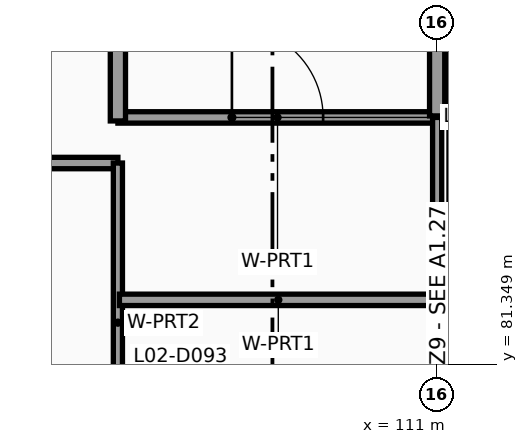
"""IFC4 building model, lengths in metres.
Left out: names, types, materials, properties, quantities, classifications, styles, units other than length and angle.
Written with IfcOpenShell. Run it as: python <this file> out.ifc"""

import sys

from ifc_helpers import new_model, si_unit, direction, frame, frame_2d, origin, place, context, subcontext, project, spatial, rectangle, extrude, element, fill, save


model = new_model("IFC4")
c1 = context("Model", 3, precision=1e-05, world=origin(), true_north=direction((0.0, 1.0)))
c2 = subcontext(c1, "Body", "Model", "MODEL_VIEW")
j1 = project(units=[si_unit("LENGTHUNIT", "METRE"), si_unit("PLANEANGLEUNIT", "RADIAN")], contexts=[c1])
p1 = place(None, origin())
s1 = spatial("IfcSite", under=j1, at=p1, CompositionType="ELEMENT")
p2 = place(p1, origin())
s2 = spatial("IfcBuilding", under=s1, at=p2, CompositionType="ELEMENT")
p3 = place(p2, frame((0.0, 0.0, 7.8)))
s3 = spatial("IfcBuildingStorey", under=s2, at=p3, CompositionType="ELEMENT", Elevation=7.8)
p4 = place(p3, frame((102.6, 84.0, 0.0), z_axis=(0.0, 0.0, 1.0), x_axis=(1.0, 0.0, 0.0)))
e1 = element("IfcWall", 1, at=p4, inside=s3, PredefinedType="PARTITIONING", context=c2, shape_type="SweptSolid", body=[
    extrude(rectangle(XDim=4.2, YDim=0.15, at=frame_2d((2.1, 0.0))), origin(), (0.0, 0.0, 1.0), 2.74),
])
p5 = place(p4, frame((1.475, 0.0, 0.0)))
e2 = element("IfcOpeningElement", 2, at=p5, cuts=e1, PredefinedType="OPENING", context=c2, shape_type="SweptSolid", body=[
    extrude(rectangle(XDim=1.25, YDim=2.15, at=frame_2d((0.625, 1.075))), frame((0.0, 0.085, 0.0), z_axis=(0.0, -1.0, 0.0), x_axis=(1.0, 0.0, 0.0)), (0.0, 0.0, 1.0), 0.17),
])
p6 = place(p3, frame((106.8, 84.0, 0.0), z_axis=(0.0, 0.0, 1.0), x_axis=(0.0, -1.0, 0.0)))
e3 = element("IfcWall", 3, at=p6, inside=s3, PredefinedType="PARTITIONING", context=c2, shape_type="SweptSolid", body=[
    extrude(rectangle(XDim=4.2, YDim=0.12, at=frame_2d((2.1, 0.0))), origin(), (0.0, 0.0, 1.0), 2.95),
])
p7 = place(p3, frame((106.82, 82.2, 0.0), z_axis=(0.0, 0.0, 1.0), x_axis=(1.0, 0.0, 0.0)))
e4 = element("IfcWall", 4, at=p7, inside=s3, PredefinedType="PARTITIONING", context=c2, shape_type="SweptSolid", body=[
    extrude(rectangle(XDim=4.18, YDim=0.15, at=frame_2d((2.09, 0.0))), origin(), (0.0, 0.0, 1.0), 2.94),
])
p8 = place(p3, frame((111.0, 82.2, 0.0), z_axis=(0.0, 0.0, 1.0), x_axis=(0.0, -1.0, 0.0)))
e5 = element("IfcWall", 5, at=p8, inside=s3, PredefinedType="PARTITIONING", context=c2, shape_type="SweptSolid", body=[
    extrude(rectangle(XDim=2.127, YDim=0.12, at=frame_2d((1.063, 0.0))), origin(), (0.0, 0.0, 1.0), 2.94),
])
p9 = place(p3, frame((106.8, 84.6, 0.0), z_axis=(0.0, 0.0, 1.0), x_axis=(1.0, 0.0, 0.0)))
e6 = element("IfcWall", 6, at=p9, inside=s3, PredefinedType="PARTITIONING", context=c2, shape_type="SweptSolid", body=[
    extrude(rectangle(XDim=4.2, YDim=0.15, at=frame_2d((2.1, 0.0))), origin(), (0.0, 0.0, 1.0), 2.94),
])
p10 = place(p9, frame((1.5, 0.0, 0.0)))
e7 = element("IfcOpeningElement", 7, at=p10, cuts=e6, PredefinedType="OPENING", context=c2, shape_type="SweptSolid", body=[
    extrude(rectangle(XDim=1.2, YDim=2.15, at=frame_2d((0.6, 1.075))), frame((0.0, 0.085, 0.0), z_axis=(0.0, -1.0, 0.0), x_axis=(1.0, 0.0, 0.0)), (0.0, 0.0, 1.0), 0.17),
])
p11 = place(p3, frame((111.0, 84.6, 0.0), z_axis=(0.0, 0.0, 1.0), x_axis=(0.0, -1.0, 0.0)))
e8 = element("IfcWall", 8, at=p11, inside=s3, PredefinedType="PARTITIONING", context=c2, shape_type="SweptSolid", body=[
    extrude(rectangle(XDim=2.38, YDim=0.12, at=frame_2d((1.19, 0.0))), origin(), (0.0, 0.0, 1.0), 2.94),
])
p12 = place(p3, frame((106.8, 88.2, 0.0), z_axis=(0.0, 0.0, 1.0), x_axis=(0.0, -1.0, 0.0)))
e9 = element("IfcWall", 9, at=p12, inside=s3, PredefinedType="PARTITIONING", context=c2, shape_type="SweptSolid", body=[
    extrude(rectangle(XDim=3.646, YDim=0.2, at=frame_2d((1.823, 0.0))), origin(), (0.0, 0.0, 1.0), 2.59),
])
p13 = place(p3, frame((111.0, 87.927, 0.0), z_axis=(0.0, 0.0, 1.0), x_axis=(0.0, -1.0, 0.0)))
e10 = element("IfcWall", 10, at=p13, inside=s3, PredefinedType="PARTITIONING", context=c2, shape_type="SweptSolid", body=[
    extrude(rectangle(XDim=3.307, YDim=0.2, at=frame_2d((1.653, 0.0))), origin(), (0.0, 0.0, 1.0), 2.94),
])
p14 = place(p10, origin())
e11 = element("IfcDoor", 11, at=p14, inside=s3, OperationType="SINGLE_SWING_LEFT", PredefinedType="DOOR", context=c2, shape_type="SweptSolid", body=[
    extrude(rectangle(XDim=1.2, YDim=2.15, at=frame_2d((0.6, 1.075))), frame((0.0, 0.025, 0.0), z_axis=(0.0, -1.0, 0.0), x_axis=(1.0, 0.0, 0.0)), (0.0, 0.0, 1.0), 0.05),
])
fill(e7, e11)
save(model, sys.argv[1])
